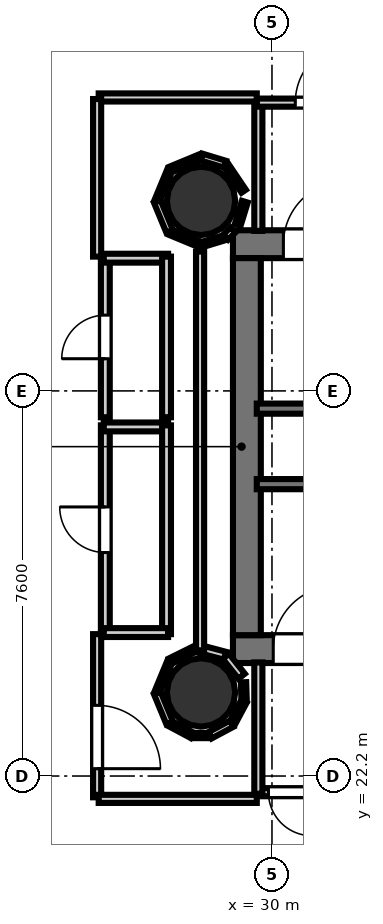
"""IFC4 building model, lengths in metres.
Left out: names, types, materials, properties, quantities, classifications, styles, units other than length and angle.
Written with IfcOpenShell. Run it as: python <this file> out.ifc"""

import sys

from ifc_helpers import new_model, si_unit, direction, frame, frame_2d, origin, origin_2d, place, context, subcontext, project, spatial, rectangle, hollow_circle, extrude, element, fill, save


model = new_model("IFC4")
c1 = context("Model", 3, precision=1e-05, world=origin(), true_north=direction((0.0, 1.0)))
c2 = subcontext(c1, "Body", "Model", "MODEL_VIEW")
j1 = project(units=[si_unit("LENGTHUNIT", "METRE"), si_unit("PLANEANGLEUNIT", "RADIAN")], contexts=[c1])
p1 = place(None, origin())
s1 = spatial("IfcSite", under=j1, at=p1, CompositionType="ELEMENT")
p2 = place(p1, origin())
s2 = spatial("IfcBuilding", under=s1, at=p2, CompositionType="ELEMENT")
p3 = place(p2, frame((0.0, 0.0, 180.9)))
s3 = spatial("IfcBuildingStorey", under=s2, at=p3, CompositionType="ELEMENT", Elevation=180.9)
p4 = place(p3, frame((29.23, 32.695, 0.0), z_axis=(0.0, 0.0, 1.0), x_axis=(1.0, 0.0, 0.0)))
e1 = element("IfcWall", 1, at=p4, inside=s3, PredefinedType="SHEAR", context=c2, shape_type="SweptSolid", body=[
    extrude(rectangle(XDim=10.62, YDim=0.55, at=frame_2d((5.31, 0.0))), origin(), (0.0, 0.0, 1.0), 3.4),
])
p5 = place(p4, frame((0.995, 0.0, 0.0)))
e2 = element("IfcOpeningElement", 2, at=p5, cuts=e1, PredefinedType="OPENING", context=c2, shape_type="SweptSolid", body=[
    extrude(rectangle(XDim=1.25, YDim=2.15, at=frame_2d((0.625, 1.075))), frame((0.0, 0.285, 0.0), z_axis=(0.0, -1.0, 0.0), x_axis=(1.0, 0.0, 0.0)), (0.0, 0.0, 1.0), 0.57),
])
p6 = place(p3, frame((29.23, 24.705, 0.0), z_axis=(0.0, 0.0, 1.0), x_axis=(1.0, 0.0, 0.0)))
e3 = element("IfcWall", 3, at=p6, inside=s3, PredefinedType="SHEAR", context=c2, shape_type="SweptSolid", body=[
    extrude(rectangle(XDim=10.62, YDim=0.55, at=frame_2d((5.31, 0.0))), origin(), (0.0, 0.0, 1.0), 3.4),
])
p7 = place(p6, frame((0.795, 0.0, 0.0)))
e4 = element("IfcOpeningElement", 4, at=p7, cuts=e3, PredefinedType="OPENING", context=c2, shape_type="SweptSolid", body=[
    extrude(rectangle(XDim=1.25, YDim=2.15, at=frame_2d((0.625, 1.075))), frame((0.0, 0.285, 0.0), z_axis=(0.0, -1.0, 0.0), x_axis=(1.0, 0.0, 0.0)), (0.0, 0.0, 1.0), 0.57),
])
p8 = place(p3, frame((29.505, 24.98, 0.0), z_axis=(0.0, 0.0, 1.0), x_axis=(0.0, 1.0, 0.0)))
e5 = element("IfcWall", 5, at=p8, inside=s3, PredefinedType="SHEAR", context=c2, shape_type="SweptSolid", body=[
    extrude(rectangle(XDim=7.44, YDim=0.55, at=frame_2d((3.72, 0.0))), origin(), (0.0, 0.0, 1.0), 3.4),
])
for number, where, z_axis, x_axis in (
    (6, (28.6, 33.55, 0.0), (0.0, 0.0, 1.0), (1.0, 0.0, 0.0)),
    (7, (28.6, 23.85, 0.0), (0.0, 0.0, 1.0), (1.0, 0.0, 0.0)),
):
    element("IfcColumn", number, at=place(p3, frame(where, z_axis=z_axis, x_axis=x_axis)), inside=s3, PredefinedType="COLUMN", context=c2, shape_type="SweptSolid", body=[
        extrude(hollow_circle(Radius=0.675, WallThickness=0.032, at=origin_2d()), origin(), (0.0, 0.0, 1.0), 3.7),
    ])
p9 = place(p3, frame((26.522, 41.562, 0.0), z_axis=(0.0, 0.0, 1.0), x_axis=(-0.767540623089, -0.6410003057, 0.0)))
e8 = element("IfcWall", 8, at=p9, inside=s3, PredefinedType="SOLIDWALL", context=c2, shape_type="SweptSolid", body=[
    extrude(rectangle(XDim=8.061, YDim=0.28, at=frame_2d((4.03, 0.0))), origin(), (0.0, 0.0, 1.0), 3.4),
])
p10 = place(p9, frame((1.668, 0.0, 0.85)))
e9 = element("IfcOpeningElement", 9, at=p10, cuts=e8, PredefinedType="OPENING", context=c2, shape_type="SweptSolid", body=[
    extrude(rectangle(XDim=1.5, YDim=2.1, at=frame_2d((0.75, 1.05))), frame((0.0, 0.15, 0.0), z_axis=(0.0, -1.0, 0.0), x_axis=(1.0, 0.0, 0.0)), (0.0, 0.0, 1.0), 0.3),
])
p11 = place(p3, frame((29.7, 29.45, 0.0), z_axis=(0.0, 0.0, 1.0), x_axis=(1.0, 0.0, 0.0)))
e10 = element("IfcWall", 10, at=p11, inside=s3, PredefinedType="SOLIDWALL", context=c2, shape_type="SweptSolid", body=[
    extrude(rectangle(XDim=8.3, YDim=0.2, at=frame_2d((4.15, 0.0))), origin(), (0.0, 0.0, 1.0), 3.4),
])
p12 = place(p3, frame((29.7, 27.96, 0.0), z_axis=(0.0, 0.0, 1.0), x_axis=(1.0, 0.0, 0.0)))
e11 = element("IfcWall", 11, at=p12, inside=s3, PredefinedType="SOLIDWALL", context=c2, shape_type="SweptSolid", body=[
    extrude(rectangle(XDim=7.75, YDim=0.2, at=frame_2d((3.875, 0.0))), origin(), (0.0, 0.0, 1.0), 3.4),
])
p13 = place(p3, frame((29.731, 32.958, 0.0), z_axis=(0.0, 0.0, 1.0), x_axis=(0.0, 1.0, 0.0)))
e12 = element("IfcWall", 12, at=p13, inside=s3, PredefinedType="PARTITIONING", context=c2, shape_type="SweptSolid", body=[
    extrude(rectangle(XDim=2.562, YDim=0.16, at=frame_2d((1.281, 0.0))), origin(), (0.0, 0.0, 1.0), 2.72),
])
p14 = place(p3, frame((29.7, 35.489, 0.0), z_axis=(0.0, 0.0, 1.0), x_axis=(1.0, 0.0, 0.0)))
e13 = element("IfcWall", 13, at=p14, inside=s3, PredefinedType="PARTITIONING", context=c2, shape_type="SweptSolid", body=[
    extrude(rectangle(XDim=2.72, YDim=0.16, at=frame_2d((1.36, 0.0))), origin(), (0.0, 0.0, 1.0), 2.72),
])
p15 = place(p14, frame((0.76, 0.0, 0.0)))
e14 = element("IfcOpeningElement", 14, at=p15, cuts=e13, PredefinedType="OPENING", context=c2, shape_type="SweptSolid", body=[
    extrude(rectangle(XDim=1.2, YDim=2.15, at=frame_2d((0.6, 1.075))), frame((0.0, 0.09, 0.0), z_axis=(0.0, -1.0, 0.0), x_axis=(1.0, 0.0, 0.0)), (0.0, 0.0, 1.0), 0.18),
])
p16 = place(p3, frame((33.45, 21.881, 0.0), z_axis=(0.0, 0.0, 1.0), x_axis=(-1.0, 0.0, 0.0)))
e15 = element("IfcWall", 15, at=p16, inside=s3, PredefinedType="PARTITIONING", context=c2, shape_type="SweptSolid", body=[
    extrude(rectangle(XDim=3.75, YDim=0.16, at=frame_2d((1.875, 0.0))), origin(), (0.0, 0.0, 1.0), 2.72),
])
p17 = place(p16, frame((1.275, 0.0, 0.0)))
e16 = element("IfcOpeningElement", 16, at=p17, cuts=e15, PredefinedType="OPENING", context=c2, shape_type="SweptSolid", body=[
    extrude(rectangle(XDim=1.2, YDim=2.15, at=frame_2d((0.6, 1.075))), frame((0.0, 0.09, 0.0), z_axis=(0.0, -1.0, 0.0), x_axis=(1.0, 0.0, 0.0)), (0.0, 0.0, 1.0), 0.18),
])
p18 = place(p16, frame((2.66, 0.0, 0.0)))
e17 = element("IfcOpeningElement", 17, at=p18, cuts=e15, PredefinedType="OPENING", context=c2, shape_type="SweptSolid", body=[
    extrude(rectangle(XDim=0.86, YDim=2.05, at=frame_2d((0.43, 1.025))), frame((0.0, 0.09, 0.0), z_axis=(0.0, -1.0, 0.0), x_axis=(1.0, 0.0, 0.0)), (0.0, 0.0, 1.0), 0.18),
])
p19 = place(p3, frame((29.731, 21.85, 0.0), z_axis=(0.0, 0.0, 1.0), x_axis=(0.0, 1.0, 0.0)))
e18 = element("IfcWall", 18, at=p19, inside=s3, PredefinedType="PARTITIONING", context=c2, shape_type="SweptSolid", body=[
    extrude(rectangle(XDim=2.592, YDim=0.16, at=frame_2d((1.296, 0.0))), origin(), (0.0, 0.0, 1.0), 2.72),
])
p20 = place(p3, frame((26.711, 25.0, 0.0), z_axis=(0.0, 0.0, 1.0), x_axis=(0.0, 1.0, 0.0)))
e19 = element("IfcWall", 19, at=p20, inside=s3, PredefinedType="PLUMBINGWALL", context=c2, shape_type="SweptSolid", body=[
    extrude(rectangle(XDim=4.12, YDim=0.175, at=frame_2d((2.06, 0.0))), origin(), (0.0, 0.0, 1.0), 2.72),
])
p21 = place(p20, frame((1.61, 0.0, 0.0)))
e20 = element("IfcOpeningElement", 20, at=p21, cuts=e19, PredefinedType="OPENING", context=c2, shape_type="SweptSolid", body=[
    extrude(rectangle(XDim=0.9, YDim=2.1, at=frame_2d((0.45, 1.05))), frame((0.0, 0.097, 0.0), z_axis=(0.0, -1.0, 0.0), x_axis=(1.0, 0.0, 0.0)), (0.0, 0.0, 1.0), 0.195),
])
p22 = place(p3, frame((26.68, 29.089, 0.0), z_axis=(0.0, 0.0, 1.0), x_axis=(1.0, 0.0, 0.0)))
e21 = element("IfcWall", 21, at=p22, inside=s3, PredefinedType="PLUMBINGWALL", context=c2, shape_type="SweptSolid", body=[
    extrude(rectangle(XDim=1.27, YDim=0.175, at=frame_2d((0.635, 0.0))), origin(), (0.0, 0.0, 1.0), 2.72),
])
p23 = place(p3, frame((27.919, 29.12, 0.0), z_axis=(0.0, 0.0, 1.0), x_axis=(0.0, -1.0, 0.0)))
e22 = element("IfcWall", 22, at=p23, inside=s3, PredefinedType="PLUMBINGWALL", context=c2, shape_type="SweptSolid", body=[
    extrude(rectangle(XDim=4.12, YDim=0.175, at=frame_2d((2.06, 0.0))), origin(), (0.0, 0.0, 1.0), 2.72),
])
p24 = place(p3, frame((27.95, 25.031, 0.0), z_axis=(0.0, 0.0, 1.0), x_axis=(-1.0, 0.0, 0.0)))
e23 = element("IfcWall", 23, at=p24, inside=s3, PredefinedType="PLUMBINGWALL", context=c2, shape_type="SweptSolid", body=[
    extrude(rectangle(XDim=1.27, YDim=0.175, at=frame_2d((0.635, 0.0))), origin(), (0.0, 0.0, 1.0), 2.72),
])
p25 = place(p3, frame((26.711, 29.28, 0.0), z_axis=(0.0, 0.0, 1.0), x_axis=(0.0, 1.0, 0.0)))
e24 = element("IfcWall", 24, at=p25, inside=s3, PredefinedType="PLUMBINGWALL", context=c2, shape_type="SweptSolid", body=[
    extrude(rectangle(XDim=3.17, YDim=0.175, at=frame_2d((1.585, 0.0))), origin(), (0.0, 0.0, 1.0), 2.72),
])
p26 = place(p25, frame((1.155, 0.0, 0.0)))
e25 = element("IfcOpeningElement", 25, at=p26, cuts=e24, PredefinedType="OPENING", context=c2, shape_type="SweptSolid", body=[
    extrude(rectangle(XDim=0.86, YDim=2.05, at=frame_2d((0.43, 1.025))), frame((0.0, 0.097, 0.0), z_axis=(0.0, -1.0, 0.0), x_axis=(1.0, 0.0, 0.0)), (0.0, 0.0, 1.0), 0.195),
])
p27 = place(p3, frame((26.68, 32.419, 0.0), z_axis=(0.0, 0.0, 1.0), x_axis=(1.0, 0.0, 0.0)))
e26 = element("IfcWall", 26, at=p27, inside=s3, PredefinedType="PLUMBINGWALL", context=c2, shape_type="SweptSolid", body=[
    extrude(rectangle(XDim=1.27, YDim=0.175, at=frame_2d((0.635, 0.0))), origin(), (0.0, 0.0, 1.0), 2.72),
])
p28 = place(p3, frame((27.919, 32.45, 0.0), z_axis=(0.0, 0.0, 1.0), x_axis=(0.0, -1.0, 0.0)))
e27 = element("IfcWall", 27, at=p28, inside=s3, PredefinedType="PLUMBINGWALL", context=c2, shape_type="SweptSolid", body=[
    extrude(rectangle(XDim=3.17, YDim=0.175, at=frame_2d((1.585, 0.0))), origin(), (0.0, 0.0, 1.0), 2.72),
])
p29 = place(p3, frame((29.402, 24.169, 0.0), z_axis=(0.0, 0.0, 1.0), x_axis=(-0.622091855036, 0.782944266151, 0.0)))
e28 = element("IfcWall", 28, at=p29, inside=s3, PredefinedType="PARTITIONING", context=c2, shape_type="SweptSolid", body=[
    extrude(rectangle(XDim=0.504, YDim=0.16, at=frame_2d((0.252, 0.0))), origin(), (0.0, 0.0, 1.0), 2.72),
])
p30 = place(p3, frame((29.072, 24.574, 0.0), z_axis=(0.0, 0.0, 1.0), x_axis=(-0.966842101769, 0.255374920942, 0.0)))
e29 = element("IfcWall", 29, at=p30, inside=s3, PredefinedType="PARTITIONING", context=c2, shape_type="SweptSolid", body=[
    extrude(rectangle(XDim=0.531, YDim=0.16, at=frame_2d((0.266, 0.0))), origin(), (0.0, 0.0, 1.0), 2.72),
])
p31 = place(p3, frame((28.581, 24.68, 0.0), z_axis=(0.0, 0.0, 1.0), x_axis=(0.0, 1.0, 0.0)))
e30 = element("IfcWall", 30, at=p31, inside=s3, PredefinedType="PARTITIONING", context=c2, shape_type="SweptSolid", body=[
    extrude(rectangle(XDim=7.87, YDim=0.16, at=frame_2d((3.935, 0.0))), origin(), (0.0, 0.0, 1.0), 2.72),
])
p32 = place(p3, frame((29.7, 35.591, 0.0), z_axis=(0.0, 0.0, 1.0), x_axis=(-1.0, 0.0, 0.0)))
e31 = element("IfcWall", 31, at=p32, inside=s3, PredefinedType="PARTITIONING", context=c2, shape_type="SweptSolid", body=[
    extrude(rectangle(XDim=3.12, YDim=0.16, at=frame_2d((1.56, 0.0))), origin(), (0.0, 0.0, 1.0), 2.72),
])
p33 = place(p3, frame((26.549, 35.56, 0.0), z_axis=(0.0, 0.0, 1.0), x_axis=(0.0, -1.0, 0.0)))
e32 = element("IfcWall", 32, at=p33, inside=s3, PredefinedType="PARTITIONING", context=c2, shape_type="SweptSolid", body=[
    extrude(rectangle(XDim=3.11, YDim=0.16, at=frame_2d((1.555, 0.0))), origin(), (0.0, 0.0, 1.0), 2.72),
])
p34 = place(p3, frame((26.549, 25.0, 0.0), z_axis=(0.0, 0.0, 1.0), x_axis=(0.0, -1.0, 0.0)))
e33 = element("IfcWall", 33, at=p34, inside=s3, PredefinedType="PARTITIONING", context=c2, shape_type="SweptSolid", body=[
    extrude(rectangle(XDim=3.22, YDim=0.16, at=frame_2d((1.61, 0.0))), origin(), (0.0, 0.0, 1.0), 2.72),
])
p35 = place(p34, frame((1.405, 0.0, 0.0)))
e34 = element("IfcOpeningElement", 34, at=p35, cuts=e33, PredefinedType="OPENING", context=c2, shape_type="SweptSolid", body=[
    extrude(rectangle(XDim=1.25, YDim=2.2, at=frame_2d((0.625, 1.1))), frame((0.0, 0.09, 0.0), z_axis=(0.0, -1.0, 0.0), x_axis=(1.0, 0.0, 0.0)), (0.0, 0.0, 1.0), 0.18),
])
p36 = place(p3, frame((26.58, 21.749, 0.0), z_axis=(0.0, 0.0, 1.0), x_axis=(1.0, 0.0, 0.0)))
e35 = element("IfcWall", 35, at=p36, inside=s3, PredefinedType="PARTITIONING", context=c2, shape_type="SweptSolid", body=[
    extrude(rectangle(XDim=3.12, YDim=0.16, at=frame_2d((1.56, 0.0))), origin(), (0.0, 0.0, 1.0), 2.72),
])
p37 = place(p3, frame((29.441, 33.741, 0.0), z_axis=(0.0, 0.0, 1.0), x_axis=(-0.559619584068, 0.828749613048, 0.0)))
e36 = element("IfcWall", 36, at=p37, inside=s3, PredefinedType="PARTITIONING", context=c2, shape_type="SweptSolid", body=[
    extrude(rectangle(XDim=0.629, YDim=0.105, at=frame_2d((0.314, 0.0))), origin(), (0.0, 0.0, 1.0), 2.72),
])
p38 = place(p3, frame((29.073, 34.274, 0.0), z_axis=(0.0, 0.0, 1.0), x_axis=(-0.956893067978, 0.290440452511, 0.0)))
e37 = element("IfcWall", 37, at=p38, inside=s3, PredefinedType="PARTITIONING", context=c2, shape_type="SweptSolid", body=[
    extrude(rectangle(XDim=0.485, YDim=0.14, at=frame_2d((0.243, 0.0))), origin(), (0.0, 0.0, 1.0), 2.72),
])
p39 = place(p3, frame((28.588, 34.414, 0.0), z_axis=(0.0, 0.0, 1.0), x_axis=(-0.923956302996, -0.382498039412, 0.0)))
e38 = element("IfcWall", 38, at=p39, inside=s3, PredefinedType="PARTITIONING", context=c2, shape_type="SweptSolid", body=[
    extrude(rectangle(XDim=0.639, YDim=0.12, at=frame_2d((0.319, 0.0))), origin(), (0.0, 0.0, 1.0), 2.72),
])
p40 = place(p3, frame((27.981, 34.152, 0.0), z_axis=(0.0, 0.0, 1.0), x_axis=(-0.382824178437, -0.923821221018, 0.0)))
e39 = element("IfcWall", 39, at=p40, inside=s3, PredefinedType="PARTITIONING", context=c2, shape_type="SweptSolid", body=[
    extrude(rectangle(XDim=0.639, YDim=0.105, at=frame_2d((0.319, 0.0))), origin(), (0.0, 0.0, 1.0), 2.72),
])
p41 = place(p3, frame((27.736, 33.538, 0.0), z_axis=(0.0, 0.0, 1.0), x_axis=(0.382824178437, -0.923821221018, 0.0)))
e40 = element("IfcWall", 40, at=p41, inside=s3, PredefinedType="PARTITIONING", context=c2, shape_type="SweptSolid", body=[
    extrude(rectangle(XDim=0.639, YDim=0.14, at=frame_2d((0.319, 0.0))), origin(), (0.0, 0.0, 1.0), 2.72),
])
p42 = place(p3, frame((27.998, 32.931, 0.0), z_axis=(0.0, 0.0, 1.0), x_axis=(0.923821221018, -0.382824178437, 0.0)))
e41 = element("IfcWall", 41, at=p42, inside=s3, PredefinedType="PARTITIONING", context=c2, shape_type="SweptSolid", body=[
    extrude(rectangle(XDim=0.639, YDim=0.12, at=frame_2d((0.319, 0.0))), origin(), (0.0, 0.0, 1.0), 2.72),
])
p43 = place(p3, frame((28.609, 32.685, 0.0), z_axis=(0.0, 0.0, 1.0), x_axis=(0.956893067978, 0.290440452511, 0.0)))
e42 = element("IfcWall", 42, at=p43, inside=s3, PredefinedType="PARTITIONING", context=c2, shape_type="SweptSolid", body=[
    extrude(rectangle(XDim=0.485, YDim=0.105, at=frame_2d((0.243, 0.0))), origin(), (0.0, 0.0, 1.0), 2.72),
])
p44 = place(p3, frame((29.086, 32.834, 0.0), z_axis=(0.0, 0.0, 1.0), x_axis=(0.707106781187, 0.707106781187, 0.0)))
e43 = element("IfcWall", 43, at=p44, inside=s3, PredefinedType="PARTITIONING", context=c2, shape_type="SweptSolid", body=[
    extrude(rectangle(XDim=0.204, YDim=0.14, at=frame_2d((0.102, 0.0))), origin(), (0.0, 0.0, 1.0), 2.72),
])
p45 = place(p3, frame((29.324, 33.077, 0.0), z_axis=(0.0, 0.0, 1.0), x_axis=(0.292866596221, 0.956153312402, 0.0)))
e44 = element("IfcWall", 44, at=p45, inside=s3, PredefinedType="PARTITIONING", context=c2, shape_type="SweptSolid", body=[
    extrude(rectangle(XDim=0.479, YDim=0.12, at=frame_2d((0.239, 0.0))), origin(), (0.0, 0.0, 1.0), 2.72),
])
p46 = place(p3, frame((28.466, 24.701, 0.0), z_axis=(0.0, 0.0, 1.0), x_axis=(-0.896097594631, -0.4438570726, 0.0)))
e45 = element("IfcWall", 45, at=p46, inside=s3, PredefinedType="PARTITIONING", context=c2, shape_type="SweptSolid", body=[
    extrude(rectangle(XDim=0.524, YDim=0.12, at=frame_2d((0.262, 0.0))), origin(), (0.0, 0.0, 1.0), 2.72),
])
p47 = place(p3, frame((27.981, 24.452, 0.0), z_axis=(0.0, 0.0, 1.0), x_axis=(-0.38268910224, -0.923877183952, 0.0)))
e46 = element("IfcWall", 46, at=p47, inside=s3, PredefinedType="PARTITIONING", context=c2, shape_type="SweptSolid", body=[
    extrude(rectangle(XDim=0.639, YDim=0.105, at=frame_2d((0.32, 0.0))), origin(), (0.0, 0.0, 1.0), 2.72),
])
p48 = place(p3, frame((27.736, 23.838, 0.0), z_axis=(0.0, 0.0, 1.0), x_axis=(0.382824178437, -0.923821221018, 0.0)))
e47 = element("IfcWall", 47, at=p48, inside=s3, PredefinedType="PARTITIONING", context=c2, shape_type="SweptSolid", body=[
    extrude(rectangle(XDim=0.639, YDim=0.14, at=frame_2d((0.319, 0.0))), origin(), (0.0, 0.0, 1.0), 2.72),
])
p49 = place(p3, frame((27.995, 23.232, 0.0), z_axis=(0.0, 0.0, 1.0), x_axis=(0.88190639713, -0.471424550379, 0.0)))
e48 = element("IfcWall", 48, at=p49, inside=s3, PredefinedType="PARTITIONING", context=c2, shape_type="SweptSolid", body=[
    extrude(rectangle(XDim=0.485, YDim=0.12, at=frame_2d((0.242, 0.0))), origin(), (0.0, 0.0, 1.0), 2.72),
])
p50 = place(p3, frame((28.437, 23.0, 0.0), z_axis=(0.0, 0.0, 1.0), x_axis=(1.0, 0.0, 0.0)))
e49 = element("IfcWall", 49, at=p50, inside=s3, PredefinedType="PARTITIONING", context=c2, shape_type="SweptSolid", body=[
    extrude(rectangle(XDim=0.326, YDim=0.105, at=frame_2d((0.163, 0.0))), origin(), (0.0, 0.0, 1.0), 2.72),
])
p51 = place(p3, frame((28.778, 23.004, 0.0), z_axis=(0.0, 0.0, 1.0), x_axis=(0.88190639713, 0.471424550379, 0.0)))
e50 = element("IfcWall", 50, at=p51, inside=s3, PredefinedType="PARTITIONING", context=c2, shape_type="SweptSolid", body=[
    extrude(rectangle(XDim=0.485, YDim=0.14, at=frame_2d((0.242, 0.0))), origin(), (0.0, 0.0, 1.0), 2.72),
])
p52 = place(p3, frame((29.218, 23.245, 0.0), z_axis=(0.0, 0.0, 1.0), x_axis=(0.471424550379, 0.88190639713, 0.0)))
e51 = element("IfcWall", 51, at=p52, inside=s3, PredefinedType="PARTITIONING", context=c2, shape_type="SweptSolid", body=[
    extrude(rectangle(XDim=0.485, YDim=0.12, at=frame_2d((0.242, 0.0))), origin(), (0.0, 0.0, 1.0), 2.72),
])
p53 = place(p3, frame((29.45, 23.688, 0.0), z_axis=(0.0, 0.0, 1.0), x_axis=(-0.030919976938, 0.999521863206, 0.0)))
e52 = element("IfcWall", 52, at=p53, inside=s3, PredefinedType="PARTITIONING", context=c2, shape_type="SweptSolid", body=[
    extrude(rectangle(XDim=0.363, YDim=0.105, at=frame_2d((0.182, 0.0))), origin(), (0.0, 0.0, 1.0), 2.72),
])
p54 = place(p5, origin())
e53 = element("IfcDoor", 53, at=p54, inside=s3, OperationType="SINGLE_SWING_RIGHT", PredefinedType="DOOR", context=c2, shape_type="SweptSolid", body=[
    extrude(rectangle(XDim=1.25, YDim=2.15, at=frame_2d((0.625, 1.075))), frame((0.0, 0.025, 0.0), z_axis=(0.0, -1.0, 0.0), x_axis=(1.0, 0.0, 0.0)), (0.0, 0.0, 1.0), 0.05),
])
fill(e2, e53)
p55 = place(p7, origin())
e54 = element("IfcDoor", 54, at=p55, inside=s3, OperationType="SINGLE_SWING_RIGHT", PredefinedType="DOOR", context=c2, shape_type="SweptSolid", body=[
    extrude(rectangle(XDim=1.25, YDim=2.15, at=frame_2d((0.625, 1.075))), frame((0.0, 0.025, 0.0), z_axis=(0.0, -1.0, 0.0), x_axis=(1.0, 0.0, 0.0)), (0.0, 0.0, 1.0), 0.05),
])
fill(e4, e54)
p56 = place(p15, origin())
e55 = element("IfcDoor", 55, at=p56, inside=s3, OperationType="SINGLE_SWING_RIGHT", PredefinedType="DOOR", context=c2, shape_type="SweptSolid", body=[
    extrude(rectangle(XDim=1.2, YDim=2.15, at=frame_2d((0.6, 1.075))), frame((0.0, 0.025, 0.0), z_axis=(0.0, -1.0, 0.0), x_axis=(1.0, 0.0, 0.0)), (0.0, 0.0, 1.0), 0.05),
])
fill(e14, e55)
p57 = place(p21, origin())
e56 = element("IfcDoor", 56, at=p57, inside=s3, OperationType="SINGLE_SWING_RIGHT", PredefinedType="DOOR", context=c2, shape_type="SweptSolid", body=[
    extrude(rectangle(XDim=0.9, YDim=2.1, at=frame_2d((0.45, 1.05))), frame((0.0, 0.025, 0.0), z_axis=(0.0, -1.0, 0.0), x_axis=(1.0, 0.0, 0.0)), (0.0, 0.0, 1.0), 0.05),
])
fill(e20, e56)
p58 = place(p26, origin())
e57 = element("IfcDoor", 57, at=p58, inside=s3, OperationType="SINGLE_SWING_LEFT", PredefinedType="DOOR", context=c2, shape_type="SweptSolid", body=[
    extrude(rectangle(XDim=0.86, YDim=2.05, at=frame_2d((0.43, 1.025))), frame((0.0, 0.025, 0.0), z_axis=(0.0, -1.0, 0.0), x_axis=(1.0, 0.0, 0.0)), (0.0, 0.0, 1.0), 0.05),
])
fill(e25, e57)
p59 = place(p18, origin())
e58 = element("IfcDoor", 58, at=p59, inside=s3, OperationType="SINGLE_SWING_LEFT", PredefinedType="DOOR", context=c2, shape_type="SweptSolid", body=[
    extrude(rectangle(XDim=0.86, YDim=2.05, at=frame_2d((0.43, 1.025))), frame((0.0, 0.025, 0.0), z_axis=(0.0, -1.0, 0.0), x_axis=(1.0, 0.0, 0.0)), (0.0, 0.0, 1.0), 0.05),
])
fill(e17, e58)
p60 = place(p35, origin())
e59 = element("IfcDoor", 59, at=p60, inside=s3, OperationType="SINGLE_SWING_RIGHT", PredefinedType="DOOR", context=c2, shape_type="SweptSolid", body=[
    extrude(rectangle(XDim=1.25, YDim=2.2, at=frame_2d((0.625, 1.1))), frame((0.0, 0.025, 0.0), z_axis=(0.0, -1.0, 0.0), x_axis=(1.0, 0.0, 0.0)), (0.0, 0.0, 1.0), 0.05),
])
fill(e34, e59)
save(model, sys.argv[1])
